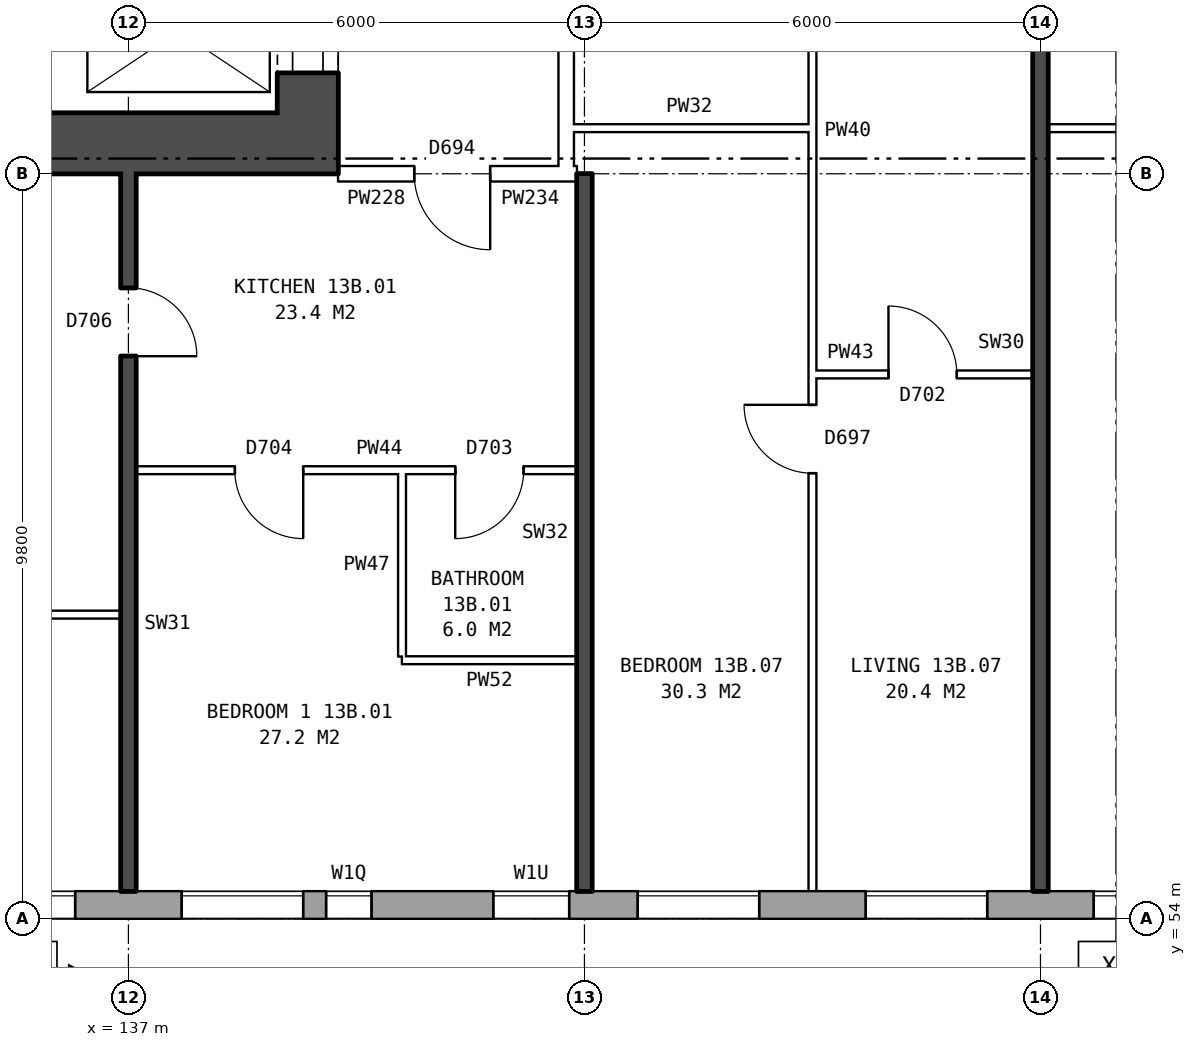
"""IFC4 building model, lengths in metres.
Left out: names, types, materials, properties, quantities, classifications, styles, units other than length and angle.
Written with IfcOpenShell. Run it as: python <this file> out.ifc"""

import sys

from ifc_helpers import new_model, si_unit, direction, frame, frame_2d, origin, place, context, subcontext, project, spatial, rectangle, extrude, element, fill, save


model = new_model("IFC4")
c1 = context("Model", 3, precision=1e-05, world=origin(), true_north=direction((0.0, 1.0)))
c2 = subcontext(c1, "Body", "Model", "MODEL_VIEW")
j1 = project(units=[si_unit("LENGTHUNIT", "METRE"), si_unit("PLANEANGLEUNIT", "RADIAN")], contexts=[c1])
p1 = place(None, origin())
s1 = spatial("IfcSite", under=j1, at=p1, CompositionType="ELEMENT")
p2 = place(p1, origin())
s2 = spatial("IfcBuilding", under=s1, at=p2, CompositionType="ELEMENT")
p3 = place(p2, frame((0.0, 0.0, 50.5)))
s3 = spatial("IfcBuildingStorey", under=s2, at=p3, CompositionType="ELEMENT", Elevation=50.5)
p4 = place(p3, frame((134.075, 54.18, 0.0), z_axis=(0.0, 0.0, 1.0), x_axis=(1.0, 0.0, 0.0)))
e1 = element("IfcWall", 1, at=p4, inside=s3, PredefinedType="STANDARD", context=c2, shape_type="SweptSolid", body=[
    extrude(rectangle(XDim=39.351, YDim=0.36, at=frame_2d((19.675, 0.0))), origin(), (0.0, 0.0, 1.0), 2.85),
])
p5 = place(p4, frame((0.625, 0.0, 0.8)))
e2 = element("IfcOpeningElement", 2, at=p5, cuts=e1, PredefinedType="OPENING", context=c2, shape_type="SweptSolid", body=[
    extrude(rectangle(XDim=1.6, YDim=1.8, at=frame_2d((0.8, 0.9))), frame((0.0, 0.19, 0.0), z_axis=(0.0, -1.0, 0.0), x_axis=(1.0, 0.0, 0.0)), (0.0, 0.0, 1.0), 0.38),
])
p6 = place(p4, frame((3.625, 0.0, 0.8)))
e3 = element("IfcOpeningElement", 3, at=p6, cuts=e1, PredefinedType="OPENING", context=c2, shape_type="SweptSolid", body=[
    extrude(rectangle(XDim=1.6, YDim=1.8, at=frame_2d((0.8, 0.9))), frame((0.0, 0.19, 0.0), z_axis=(0.0, -1.0, 0.0), x_axis=(1.0, 0.0, 0.0)), (0.0, 0.0, 1.0), 0.38),
])
p7 = place(p4, frame((5.525, 0.0, 1.4)))
e4 = element("IfcOpeningElement", 4, at=p7, cuts=e1, PredefinedType="OPENING", context=c2, shape_type="SweptSolid", body=[
    extrude(rectangle(XDim=0.6, YDim=1.2, at=frame_2d((0.3, 0.6))), frame((0.0, 0.19, 0.0), z_axis=(0.0, -1.0, 0.0), x_axis=(1.0, 0.0, 0.0)), (0.0, 0.0, 1.0), 0.38),
])
p8 = place(p4, frame((9.625, 0.0, 0.8)))
e5 = element("IfcOpeningElement", 5, at=p8, cuts=e1, PredefinedType="OPENING", context=c2, shape_type="SweptSolid", body=[
    extrude(rectangle(XDim=1.6, YDim=1.8, at=frame_2d((0.8, 0.9))), frame((0.0, 0.19, 0.0), z_axis=(0.0, -1.0, 0.0), x_axis=(1.0, 0.0, 0.0)), (0.0, 0.0, 1.0), 0.38),
])
p9 = place(p4, frame((12.625, 0.0, 0.8)))
e6 = element("IfcOpeningElement", 6, at=p9, cuts=e1, PredefinedType="OPENING", context=c2, shape_type="SweptSolid", body=[
    extrude(rectangle(XDim=1.6, YDim=1.8, at=frame_2d((0.8, 0.9))), frame((0.0, 0.19, 0.0), z_axis=(0.0, -1.0, 0.0), x_axis=(1.0, 0.0, 0.0)), (0.0, 0.0, 1.0), 0.38),
])
p10 = place(p4, frame((15.625, 0.0, 0.8)))
e7 = element("IfcOpeningElement", 7, at=p10, cuts=e1, PredefinedType="OPENING", context=c2, shape_type="SweptSolid", body=[
    extrude(rectangle(XDim=1.6, YDim=1.8, at=frame_2d((0.8, 0.9))), frame((0.0, 0.19, 0.0), z_axis=(0.0, -1.0, 0.0), x_axis=(1.0, 0.0, 0.0)), (0.0, 0.0, 1.0), 0.38),
])
p11 = place(p4, frame((18.625, 0.0, 0.8)))
e8 = element("IfcOpeningElement", 8, at=p11, cuts=e1, PredefinedType="OPENING", context=c2, shape_type="SweptSolid", body=[
    extrude(rectangle(XDim=1.6, YDim=1.8, at=frame_2d((0.8, 0.9))), frame((0.0, 0.19, 0.0), z_axis=(0.0, -1.0, 0.0), x_axis=(1.0, 0.0, 0.0)), (0.0, 0.0, 1.0), 0.38),
])
p12 = place(p4, frame((21.625, 0.0, 0.8)))
e9 = element("IfcOpeningElement", 9, at=p12, cuts=e1, PredefinedType="OPENING", context=c2, shape_type="SweptSolid", body=[
    extrude(rectangle(XDim=1.6, YDim=1.8, at=frame_2d((0.8, 0.9))), frame((0.0, 0.19, 0.0), z_axis=(0.0, -1.0, 0.0), x_axis=(1.0, 0.0, 0.0)), (0.0, 0.0, 1.0), 0.38),
])
p13 = place(p4, frame((24.625, 0.0, 0.8)))
e10 = element("IfcOpeningElement", 10, at=p13, cuts=e1, PredefinedType="OPENING", context=c2, shape_type="SweptSolid", body=[
    extrude(rectangle(XDim=1.6, YDim=1.8, at=frame_2d((0.8, 0.9))), frame((0.0, 0.19, 0.0), z_axis=(0.0, -1.0, 0.0), x_axis=(1.0, 0.0, 0.0)), (0.0, 0.0, 1.0), 0.38),
])
p14 = place(p4, frame((27.625, 0.0, 0.8)))
e11 = element("IfcOpeningElement", 11, at=p14, cuts=e1, PredefinedType="OPENING", context=c2, shape_type="SweptSolid", body=[
    extrude(rectangle(XDim=1.6, YDim=1.8, at=frame_2d((0.8, 0.9))), frame((0.0, 0.19, 0.0), z_axis=(0.0, -1.0, 0.0), x_axis=(1.0, 0.0, 0.0)), (0.0, 0.0, 1.0), 0.38),
])
p15 = place(p4, frame((30.125, 0.0, 0.8)))
e12 = element("IfcOpeningElement", 12, at=p15, cuts=e1, PredefinedType="OPENING", context=c2, shape_type="SweptSolid", body=[
    extrude(rectangle(XDim=0.6, YDim=1.5, at=frame_2d((0.3, 0.75))), frame((0.0, 0.19, 0.0), z_axis=(0.0, -1.0, 0.0), x_axis=(1.0, 0.0, 0.0)), (0.0, 0.0, 1.0), 0.38),
])
p16 = place(p4, frame((33.625, 0.0, 0.8)))
e13 = element("IfcOpeningElement", 13, at=p16, cuts=e1, PredefinedType="OPENING", context=c2, shape_type="SweptSolid", body=[
    extrude(rectangle(XDim=1.6, YDim=1.8, at=frame_2d((0.8, 0.9))), frame((0.0, 0.19, 0.0), z_axis=(0.0, -1.0, 0.0), x_axis=(1.0, 0.0, 0.0)), (0.0, 0.0, 1.0), 0.38),
])
p17 = place(p4, frame((36.625, 0.0, 0.8)))
e14 = element("IfcOpeningElement", 14, at=p17, cuts=e1, PredefinedType="OPENING", context=c2, shape_type="SweptSolid", body=[
    extrude(rectangle(XDim=1.6, YDim=1.8, at=frame_2d((0.8, 0.9))), frame((0.0, 0.19, 0.0), z_axis=(0.0, -1.0, 0.0), x_axis=(1.0, 0.0, 0.0)), (0.0, 0.0, 1.0), 0.38),
])
p18 = place(p4, frame((7.725, 0.0, 0.8)))
e15 = element("IfcOpeningElement", 15, at=p18, cuts=e1, PredefinedType="OPENING", context=c2, shape_type="SweptSolid", body=[
    extrude(rectangle(XDim=1.0, YDim=0.9, at=frame_2d((0.5, 0.45))), frame((0.0, 0.19, 0.0), z_axis=(0.0, -1.0, 0.0), x_axis=(1.0, 0.0, 0.0)), (0.0, 0.0, 1.0), 0.38),
])
p19 = place(p4, frame((31.025, 0.0, 0.8)))
e16 = element("IfcOpeningElement", 16, at=p19, cuts=e1, PredefinedType="OPENING", context=c2, shape_type="SweptSolid", body=[
    extrude(rectangle(XDim=0.6, YDim=0.9, at=frame_2d((0.3, 0.45))), frame((0.0, 0.19, 0.0), z_axis=(0.0, -1.0, 0.0), x_axis=(1.0, 0.0, 0.0)), (0.0, 0.0, 1.0), 0.38),
])
p20 = place(p3, frame((139.36, 64.6, 0.0), z_axis=(0.0, 0.0, 1.0), x_axis=(0.0, 1.0, 0.0)))
e17 = element("IfcWall", 17, at=p20, inside=s3, PredefinedType="SHEAR", context=c2, shape_type="SweptSolid", body=[
    extrude(rectangle(XDim=10.8, YDim=0.8, at=frame_2d((5.4, 0.0))), origin(), (0.0, 0.0, 1.0), 2.85),
])
p21 = place(p20, frame((0.525, 0.0, 0.0)))
e18 = element("IfcOpeningElement", 18, at=p21, cuts=e17, PredefinedType="OPENING", context=c2, shape_type="SweptSolid", body=[
    extrude(rectangle(XDim=1.1, YDim=2.1, at=frame_2d((0.55, 1.05))), frame((0.0, 0.41, 0.0), z_axis=(0.0, -1.0, 0.0), x_axis=(1.0, 0.0, 0.0)), (0.0, 0.0, 1.0), 0.82),
])
p22 = place(p20, frame((9.1, 0.0, 0.0)))
e19 = element("IfcOpeningElement", 19, at=p22, cuts=e17, PredefinedType="OPENING", context=c2, shape_type="SweptSolid", body=[
    extrude(rectangle(XDim=1.1, YDim=2.1, at=frame_2d((0.55, 1.05))), frame((0.0, 0.41, 0.0), z_axis=(0.0, -1.0, 0.0), x_axis=(1.0, 0.0, 0.0)), (0.0, 0.0, 1.0), 0.82),
])
p23 = place(p20, frame((7.325, 0.0, 0.0)))
e20 = element("IfcOpeningElement", 20, at=p23, cuts=e17, PredefinedType="OPENING", context=c2, shape_type="SweptSolid", body=[
    extrude(rectangle(XDim=0.85, YDim=2.1, at=frame_2d((0.425, 1.05))), frame((0.0, 0.41, 0.0), z_axis=(0.0, -1.0, 0.0), x_axis=(1.0, 0.0, 0.0)), (0.0, 0.0, 1.0), 0.82),
])
p24 = place(p3, frame((139.76, 64.2, 0.0), z_axis=(0.0, 0.0, 1.0), x_axis=(-1.0, 0.0, 0.0)))
e21 = element("IfcWall", 21, at=p24, inside=s3, PredefinedType="SHEAR", context=c2, shape_type="SweptSolid", body=[
    extrude(rectangle(XDim=8.4, YDim=0.8, at=frame_2d((4.2, 0.0))), origin(), (0.0, 0.0, 1.0), 2.85),
])
p25 = place(p3, frame((142.76, 63.9, 0.0), z_axis=(0.0, 0.0, 1.0), x_axis=(0.0, 1.0, 0.0)))
e22 = element("IfcWall", 22, at=p25, inside=s3, PredefinedType="PARTITIONING", context=c2, shape_type="SweptSolid", body=[
    extrude(rectangle(XDim=12.2, YDim=0.2, at=frame_2d((6.1, 0.0))), origin(), (0.0, 0.0, 1.0), 2.85),
])
p26 = place(p25, frame((5.1, 0.0, 0.0)))
e23 = element("IfcOpeningElement", 23, at=p26, cuts=e22, PredefinedType="OPENING", context=c2, shape_type="SweptSolid", body=[
    extrude(rectangle(XDim=2.0, YDim=2.1, at=frame_2d((1.0, 1.05))), frame((0.0, 0.11, 0.0), z_axis=(0.0, -1.0, 0.0), x_axis=(1.0, 0.0, 0.0)), (0.0, 0.0, 1.0), 0.22),
])
p27 = place(p3, frame((140.6, 57.4, 0.0), z_axis=(0.0, 0.0, 1.0), x_axis=(1.0, 0.0, 0.0)))
e24 = element("IfcWall", 24, at=p27, inside=s3, PredefinedType="PARTITIONING", context=c2, shape_type="SweptSolid", body=[
    extrude(rectangle(XDim=2.3, YDim=0.1, at=frame_2d((1.15, 0.0))), origin(), (0.0, 0.0, 1.0), 2.85),
])
p28 = place(p3, frame((131.36, 58.0, 0.0), z_axis=(0.0, 0.0, 1.0), x_axis=(1.0, 0.0, 0.0)))
e25 = element("IfcWall", 25, at=p28, inside=s3, PredefinedType="PARTITIONING", context=c2, shape_type="SweptSolid", body=[
    extrude(rectangle(XDim=5.54, YDim=0.1, at=frame_2d((2.77, 0.0))), origin(), (0.0, 0.0, 1.0), 2.85),
])
p29 = place(p28, frame((2.32, 0.0, 0.0)))
e26 = element("IfcOpeningElement", 26, at=p29, cuts=e25, PredefinedType="OPENING", context=c2, shape_type="SweptSolid", body=[
    extrude(rectangle(XDim=0.9, YDim=2.1, at=frame_2d((0.45, 1.05))), frame((0.0, 0.06, 0.0), z_axis=(0.0, -1.0, 0.0), x_axis=(1.0, 0.0, 0.0)), (0.0, 0.0, 1.0), 0.12),
])
p30 = place(p3, frame((137.1, 59.9, 0.0), z_axis=(0.0, 0.0, 1.0), x_axis=(1.0, 0.0, 0.0)))
e27 = element("IfcWall", 27, at=p30, inside=s3, PredefinedType="PARTITIONING", context=c2, shape_type="SweptSolid", body=[
    extrude(rectangle(XDim=5.8, YDim=0.1, at=frame_2d((2.9, 0.0))), origin(), (0.0, 0.0, 1.0), 2.85),
])
p31 = place(p30, frame((1.3, 0.0, 0.0)))
e28 = element("IfcOpeningElement", 28, at=p31, cuts=e27, PredefinedType="OPENING", context=c2, shape_type="SweptSolid", body=[
    extrude(rectangle(XDim=0.9, YDim=2.1, at=frame_2d((0.45, 1.05))), frame((0.0, 0.06, 0.0), z_axis=(0.0, -1.0, 0.0), x_axis=(1.0, 0.0, 0.0)), (0.0, 0.0, 1.0), 0.12),
])
p32 = place(p30, frame((4.2, 0.0, 0.0)))
e29 = element("IfcOpeningElement", 29, at=p32, cuts=e27, PredefinedType="OPENING", context=c2, shape_type="SweptSolid", body=[
    extrude(rectangle(XDim=0.9, YDim=2.1, at=frame_2d((0.45, 1.05))), frame((0.0, 0.06, 0.0), z_axis=(0.0, -1.0, 0.0), x_axis=(1.0, 0.0, 0.0)), (0.0, 0.0, 1.0), 0.12),
])
p33 = place(p3, frame((146.0, 61.16, 0.0), z_axis=(0.0, 0.0, 1.0), x_axis=(1.0, 0.0, 0.0)))
e30 = element("IfcWall", 30, at=p33, inside=s3, PredefinedType="PARTITIONING", context=c2, shape_type="SweptSolid", body=[
    extrude(rectangle(XDim=2.9, YDim=0.1, at=frame_2d((1.45, 0.0))), origin(), (0.0, 0.0, 1.0), 2.85),
])
p34 = place(p33, frame((1.0, 0.0, 0.0)))
e31 = element("IfcOpeningElement", 31, at=p34, cuts=e30, PredefinedType="OPENING", context=c2, shape_type="SweptSolid", body=[
    extrude(rectangle(XDim=0.9, YDim=2.1, at=frame_2d((0.45, 1.05))), frame((0.0, 0.06, 0.0), z_axis=(0.0, -1.0, 0.0), x_axis=(1.0, 0.0, 0.0)), (0.0, 0.0, 1.0), 0.12),
])
p35 = place(p3, frame((139.76, 63.8, 0.0), z_axis=(0.0, 0.0, 1.0), x_axis=(1.0, 0.0, 0.0)))
e32 = element("IfcWall", 32, at=p35, inside=s3, PredefinedType="PARTITIONING", context=c2, shape_type="SweptSolid", body=[
    extrude(rectangle(XDim=3.0, YDim=0.2, at=frame_2d((1.5, 0.0))), origin(), (0.0, 0.0, 1.0), 2.85),
])
p36 = place(p35, frame((1.0, 0.0, 0.0)))
e33 = element("IfcOpeningElement", 33, at=p36, cuts=e32, PredefinedType="OPENING", context=c2, shape_type="SweptSolid", body=[
    extrude(rectangle(XDim=1.0, YDim=2.1, at=frame_2d((0.5, 1.05))), frame((0.0, 0.11, 0.0), z_axis=(0.0, -1.0, 0.0), x_axis=(1.0, 0.0, 0.0)), (0.0, 0.0, 1.0), 0.22),
])
p37 = place(p3, frame((142.76, 63.8, 0.0), z_axis=(0.0, 0.0, 1.0), x_axis=(1.0, 0.0, 0.0)))
e34 = element("IfcWall", 34, at=p37, inside=s3, PredefinedType="PARTITIONING", context=c2, shape_type="SweptSolid", body=[
    extrude(rectangle(XDim=0.14, YDim=0.2, at=frame_2d((0.07, 0.0))), origin(), (0.0, 0.0, 1.0), 2.85),
])
p38 = place(p3, frame((142.76, 64.4, 0.0), z_axis=(0.0, 0.0, 1.0), x_axis=(1.0, 0.0, 0.0)))
e35 = element("IfcWall", 35, at=p38, inside=s3, PredefinedType="PARTITIONING", context=c2, shape_type="SweptSolid", body=[
    extrude(rectangle(XDim=3.24, YDim=0.1, at=frame_2d((1.62, 0.0))), origin(), (0.0, 0.0, 1.0), 2.85),
])
p39 = place(p3, frame((149.1, 64.4, 0.0), z_axis=(0.0, 0.0, 1.0), x_axis=(1.0, 0.0, 0.0)))
e36 = element("IfcWall", 36, at=p39, inside=s3, PredefinedType="PARTITIONING", context=c2, shape_type="SweptSolid", body=[
    extrude(rectangle(XDim=2.9, YDim=0.1, at=frame_2d((1.45, 0.0))), origin(), (0.0, 0.0, 1.0), 2.85),
])
p40 = place(p3, frame((137.0, 54.36, 0.0), z_axis=(0.0, 0.0, 1.0), x_axis=(0.0, 1.0, 0.0)))
e37 = element("IfcWall", 37, at=p40, inside=s3, PredefinedType="SOLIDWALL", context=c2, shape_type="SweptSolid", body=[
    extrude(rectangle(XDim=9.44, YDim=0.2, at=frame_2d((4.72, 0.0))), origin(), (0.0, 0.0, 1.0), 2.85),
])
p41 = place(p40, frame((7.04, 0.0, 0.0)))
e38 = element("IfcOpeningElement", 38, at=p41, cuts=e37, PredefinedType="OPENING", context=c2, shape_type="SweptSolid", body=[
    extrude(rectangle(XDim=0.9, YDim=2.1, at=frame_2d((0.45, 1.05))), frame((0.0, 0.11, 0.0), z_axis=(0.0, -1.0, 0.0), x_axis=(1.0, 0.0, 0.0)), (0.0, 0.0, 1.0), 0.22),
])
p42 = place(p3, frame((140.6, 57.45, 0.0), z_axis=(0.0, 0.0, 1.0), x_axis=(0.0, 1.0, 0.0)))
e39 = element("IfcWall", 39, at=p42, inside=s3, PredefinedType="PARTITIONING", context=c2, shape_type="SweptSolid", body=[
    extrude(rectangle(XDim=2.4, YDim=0.1, at=frame_2d((1.2, 0.0))), origin(), (0.0, 0.0, 1.0), 2.85),
])
p43 = place(p3, frame((143.0, 54.36, 0.0), z_axis=(0.0, 0.0, 1.0), x_axis=(0.0, 1.0, 0.0)))
e40 = element("IfcWall", 40, at=p43, inside=s3, PredefinedType="SOLIDWALL", context=c2, shape_type="SweptSolid", body=[
    extrude(rectangle(XDim=9.44, YDim=0.2, at=frame_2d((4.72, 0.0))), origin(), (0.0, 0.0, 1.0), 2.85),
])
p44 = place(p3, frame((146.0, 54.36, 0.0), z_axis=(0.0, 0.0, 1.0), x_axis=(0.0, 1.0, 0.0)))
e41 = element("IfcWall", 41, at=p44, inside=s3, PredefinedType="PARTITIONING", context=c2, shape_type="SweptSolid", body=[
    extrude(rectangle(XDim=14.34, YDim=0.1, at=frame_2d((7.17, 0.0))), origin(), (0.0, 0.0, 1.0), 2.85),
])
p45 = place(p44, frame((5.5, 0.0, 0.0)))
e42 = element("IfcOpeningElement", 42, at=p45, cuts=e41, PredefinedType="OPENING", context=c2, shape_type="SweptSolid", body=[
    extrude(rectangle(XDim=0.9, YDim=2.1, at=frame_2d((0.45, 1.05))), frame((0.0, 0.06, 0.0), z_axis=(0.0, -1.0, 0.0), x_axis=(1.0, 0.0, 0.0)), (0.0, 0.0, 1.0), 0.12),
])
p46 = place(p44, frame((13.04, 0.0, 0.0)))
e43 = element("IfcOpeningElement", 43, at=p46, cuts=e41, PredefinedType="OPENING", context=c2, shape_type="SweptSolid", body=[
    extrude(rectangle(XDim=0.9, YDim=2.1, at=frame_2d((0.45, 1.05))), frame((0.0, 0.06, 0.0), z_axis=(0.0, -1.0, 0.0), x_axis=(1.0, 0.0, 0.0)), (0.0, 0.0, 1.0), 0.12),
])
p47 = place(p3, frame((149.0, 54.36, 0.0), z_axis=(0.0, 0.0, 1.0), x_axis=(0.0, 1.0, 0.0)))
e44 = element("IfcWall", 44, at=p47, inside=s3, PredefinedType="SOLIDWALL", context=c2, shape_type="SweptSolid", body=[
    extrude(rectangle(XDim=14.44, YDim=0.2, at=frame_2d((7.22, 0.0))), origin(), (0.0, 0.0, 1.0), 2.85),
])
p48 = place(p5, origin())
e45 = element("IfcWindow", 45, at=p48, inside=s3, PartitioningType="SINGLE_PANEL", PredefinedType="WINDOW", context=c2, shape_type="SweptSolid", body=[
    extrude(rectangle(XDim=1.6, YDim=1.8, at=frame_2d((0.8, 0.9))), frame((0.0, 0.15, 0.0), z_axis=(0.0, -1.0, 0.0), x_axis=(1.0, 0.0, 0.0)), (0.0, 0.0, 1.0), 0.06),
])
fill(e2, e45)
p49 = place(p6, origin())
e46 = element("IfcWindow", 46, at=p49, inside=s3, PartitioningType="SINGLE_PANEL", PredefinedType="WINDOW", context=c2, shape_type="SweptSolid", body=[
    extrude(rectangle(XDim=1.6, YDim=1.8, at=frame_2d((0.8, 0.9))), frame((0.0, 0.15, 0.0), z_axis=(0.0, -1.0, 0.0), x_axis=(1.0, 0.0, 0.0)), (0.0, 0.0, 1.0), 0.06),
])
fill(e3, e46)
p50 = place(p7, origin())
e47 = element("IfcWindow", 47, at=p50, inside=s3, PartitioningType="SINGLE_PANEL", PredefinedType="WINDOW", context=c2, shape_type="SweptSolid", body=[
    extrude(rectangle(XDim=0.6, YDim=1.2, at=frame_2d((0.3, 0.6))), frame((0.0, 0.15, 0.0), z_axis=(0.0, -1.0, 0.0), x_axis=(1.0, 0.0, 0.0)), (0.0, 0.0, 1.0), 0.06),
])
fill(e4, e47)
p51 = place(p8, origin())
e48 = element("IfcWindow", 48, at=p51, inside=s3, PartitioningType="SINGLE_PANEL", PredefinedType="WINDOW", context=c2, shape_type="SweptSolid", body=[
    extrude(rectangle(XDim=1.6, YDim=1.8, at=frame_2d((0.8, 0.9))), frame((0.0, 0.15, 0.0), z_axis=(0.0, -1.0, 0.0), x_axis=(1.0, 0.0, 0.0)), (0.0, 0.0, 1.0), 0.06),
])
fill(e5, e48)
p52 = place(p9, origin())
e49 = element("IfcWindow", 49, at=p52, inside=s3, PartitioningType="SINGLE_PANEL", PredefinedType="WINDOW", context=c2, shape_type="SweptSolid", body=[
    extrude(rectangle(XDim=1.6, YDim=1.8, at=frame_2d((0.8, 0.9))), frame((0.0, 0.15, 0.0), z_axis=(0.0, -1.0, 0.0), x_axis=(1.0, 0.0, 0.0)), (0.0, 0.0, 1.0), 0.06),
])
fill(e6, e49)
p53 = place(p10, origin())
e50 = element("IfcWindow", 50, at=p53, inside=s3, PartitioningType="SINGLE_PANEL", PredefinedType="WINDOW", context=c2, shape_type="SweptSolid", body=[
    extrude(rectangle(XDim=1.6, YDim=1.8, at=frame_2d((0.8, 0.9))), frame((0.0, 0.15, 0.0), z_axis=(0.0, -1.0, 0.0), x_axis=(1.0, 0.0, 0.0)), (0.0, 0.0, 1.0), 0.06),
])
fill(e7, e50)
p54 = place(p21, origin())
e51 = element("IfcDoor", 51, at=p54, inside=s3, OperationType="DOUBLE_DOOR_SLIDING", PredefinedType="DOOR", context=c2, shape_type="SweptSolid", body=[
    extrude(rectangle(XDim=1.1, YDim=2.1, at=frame_2d((0.55, 1.05))), frame((0.0, 0.385, 0.0), z_axis=(0.0, -1.0, 0.0), x_axis=(1.0, 0.0, 0.0)), (0.0, 0.0, 1.0), 0.05),
])
fill(e18, e51)
p55 = place(p31, frame((0.9, 0.0, 0.0), z_axis=(0.0, 0.0, 1.0), x_axis=(-1.0, 0.0, 0.0)))
e52 = element("IfcDoor", 52, at=p55, inside=s3, OperationType="SINGLE_SWING_LEFT", PredefinedType="DOOR", context=c2, shape_type="SweptSolid", body=[
    extrude(rectangle(XDim=0.9, YDim=2.1, at=frame_2d((0.45, 1.05))), frame((0.0, 0.025, 0.0), z_axis=(0.0, -1.0, 0.0), x_axis=(1.0, 0.0, 0.0)), (0.0, 0.0, 1.0), 0.05),
])
fill(e28, e52)
p56 = place(p36, frame((1.0, 0.0, 0.0), z_axis=(0.0, 0.0, 1.0), x_axis=(-1.0, 0.0, 0.0)))
e53 = element("IfcDoor", 53, at=p56, inside=s3, OperationType="SINGLE_SWING_LEFT", PredefinedType="DOOR", context=c2, shape_type="SweptSolid", body=[
    extrude(rectangle(XDim=1.0, YDim=2.1, at=frame_2d((0.5, 1.05))), frame((0.0, 0.025, 0.0), z_axis=(0.0, -1.0, 0.0), x_axis=(1.0, 0.0, 0.0)), (0.0, 0.0, 1.0), 0.05),
])
fill(e33, e53)
p57 = place(p41, frame((0.9, 0.0, 0.0), z_axis=(0.0, 0.0, 1.0), x_axis=(-1.0, 0.0, 0.0)))
e54 = element("IfcDoor", 54, at=p57, inside=s3, OperationType="SINGLE_SWING_RIGHT", PredefinedType="DOOR", context=c2, shape_type="SweptSolid", body=[
    extrude(rectangle(XDim=0.9, YDim=2.1, at=frame_2d((0.45, 1.05))), frame((0.0, 0.025, 0.0), z_axis=(0.0, -1.0, 0.0), x_axis=(1.0, 0.0, 0.0)), (0.0, 0.0, 1.0), 0.05),
])
fill(e38, e54)
p58 = place(p32, frame((0.9, 0.0, 0.0), z_axis=(0.0, 0.0, 1.0), x_axis=(-1.0, 0.0, 0.0)))
e55 = element("IfcDoor", 55, at=p58, inside=s3, OperationType="SINGLE_SWING_RIGHT", PredefinedType="DOOR", context=c2, shape_type="SweptSolid", body=[
    extrude(rectangle(XDim=0.9, YDim=2.1, at=frame_2d((0.45, 1.05))), frame((0.0, 0.025, 0.0), z_axis=(0.0, -1.0, 0.0), x_axis=(1.0, 0.0, 0.0)), (0.0, 0.0, 1.0), 0.05),
])
fill(e29, e55)
p59 = place(p45, origin())
e56 = element("IfcDoor", 56, at=p59, inside=s3, OperationType="SINGLE_SWING_RIGHT", PredefinedType="DOOR", context=c2, shape_type="SweptSolid", body=[
    extrude(rectangle(XDim=0.9, YDim=2.1, at=frame_2d((0.45, 1.05))), frame((0.0, 0.025, 0.0), z_axis=(0.0, -1.0, 0.0), x_axis=(1.0, 0.0, 0.0)), (0.0, 0.0, 1.0), 0.05),
])
fill(e42, e56)
p60 = place(p34, origin())
e57 = element("IfcDoor", 57, at=p60, inside=s3, OperationType="SINGLE_SWING_LEFT", PredefinedType="DOOR", context=c2, shape_type="SweptSolid", body=[
    extrude(rectangle(XDim=0.9, YDim=2.1, at=frame_2d((0.45, 1.05))), frame((0.0, 0.025, 0.0), z_axis=(0.0, -1.0, 0.0), x_axis=(1.0, 0.0, 0.0)), (0.0, 0.0, 1.0), 0.05),
])
fill(e31, e57)
p61 = place(p18, origin())
e58 = element("IfcWindow", 58, at=p61, inside=s3, PartitioningType="SINGLE_PANEL", PredefinedType="WINDOW", context=c2, shape_type="SweptSolid", body=[
    extrude(rectangle(XDim=1.0, YDim=0.9, at=frame_2d((0.5, 0.45))), frame((0.0, 0.15, 0.0), z_axis=(0.0, -1.0, 0.0), x_axis=(1.0, 0.0, 0.0)), (0.0, 0.0, 1.0), 0.06),
])
fill(e15, e58)
save(model, sys.argv[1])
